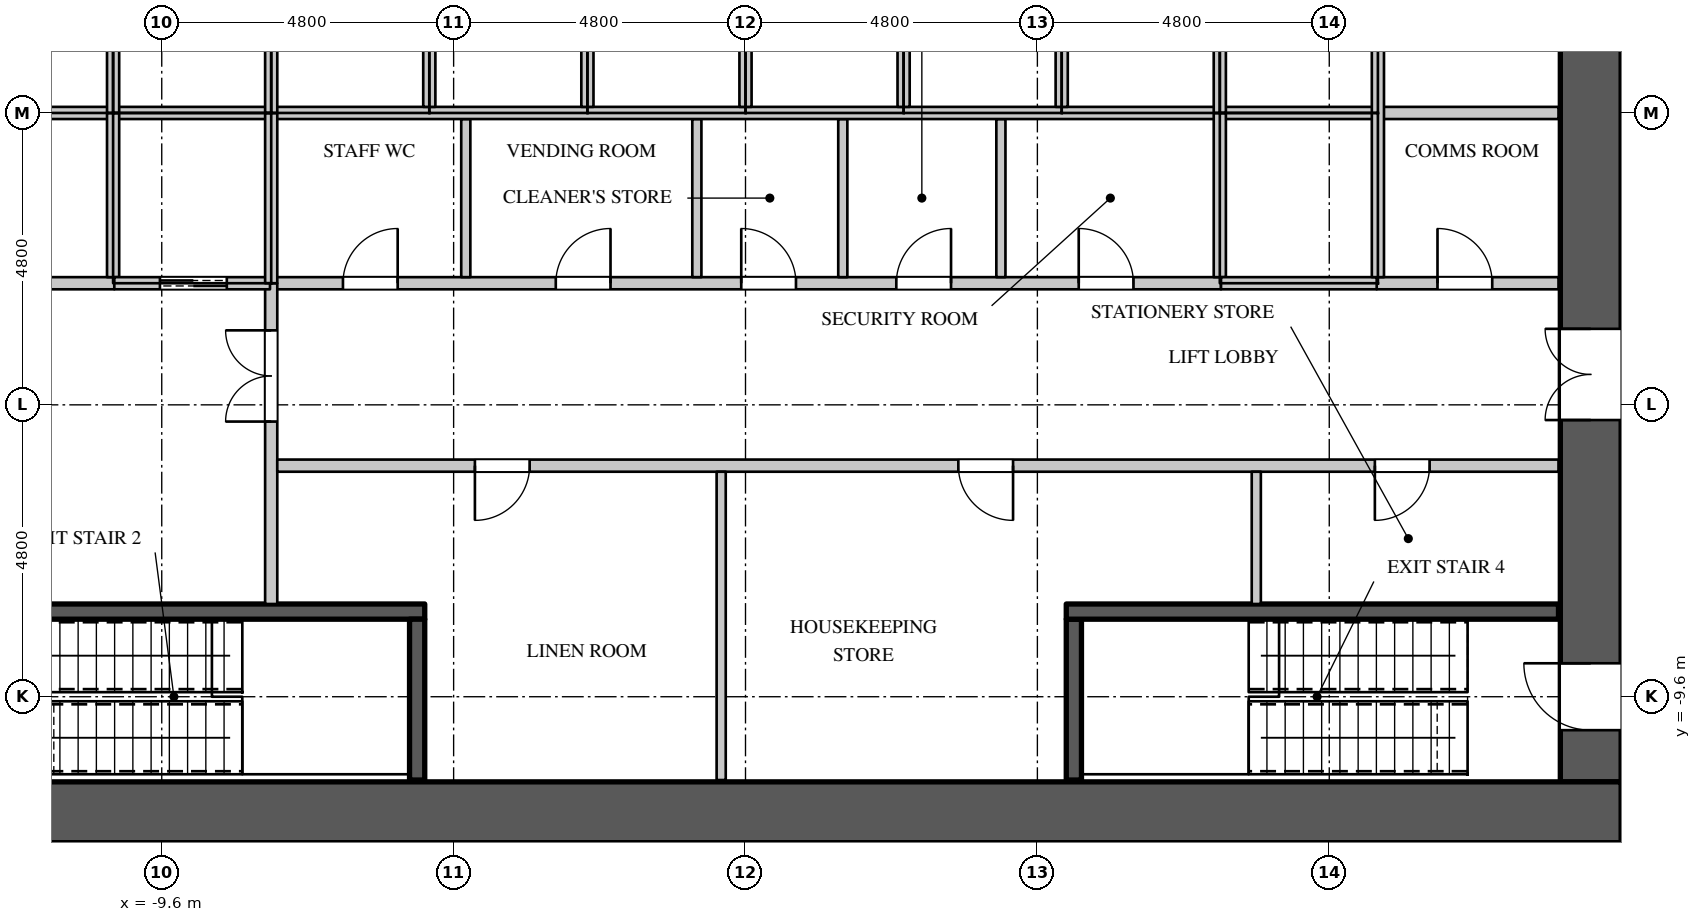
"""IFC4 building model, lengths in metres.
Left out: names, types, materials, properties, quantities, classifications, styles, units other than length and angle.
Written with IfcOpenShell. Run it as: python <this file> out.ifc"""

import sys

from ifc_helpers import new_model, si_unit, direction, frame, frame_2d, origin, place, context, subcontext, project, spatial, rectangle, extrude, element, fill, save


model = new_model("IFC4")
c1 = context("Model", 3, precision=1e-05, world=origin(), true_north=direction((0.0, 1.0)))
c2 = subcontext(c1, "Body", "Model", "MODEL_VIEW")
j1 = project(units=[si_unit("LENGTHUNIT", "METRE"), si_unit("PLANEANGLEUNIT", "RADIAN")], contexts=[c1])
p1 = place(None, origin())
s1 = spatial("IfcSite", under=j1, at=p1, CompositionType="ELEMENT")
p2 = place(p1, origin())
s2 = spatial("IfcBuilding", under=s1, at=p2, CompositionType="ELEMENT")
p3 = place(p2, frame((0.0, 0.0, 25.5)))
s3 = spatial("IfcBuildingStorey", under=s2, at=p3, CompositionType="ELEMENT", Elevation=25.5)
p4 = place(p3, frame((-14.4, -11.5, 0.0), z_axis=(0.0, 0.0, 1.0), x_axis=(1.0, 0.0, 0.0)))
e1 = element("IfcWall", 1, at=p4, inside=s3, PredefinedType="SHEAR", context=c2, shape_type="SweptSolid", body=[
    extrude(rectangle(XDim=28.8, YDim=1.0, at=frame_2d((14.4, 0.0))), origin(), (0.0, 0.0, 1.0), 4.2),
])
p5 = place(p3, frame((13.9, -11.0, 0.0), z_axis=(0.0, 0.0, 1.0), x_axis=(0.0, 1.0, 0.0)))
e2 = element("IfcWall", 2, at=p5, inside=s3, PredefinedType="SHEAR", context=c2, shape_type="SweptSolid", body=[
    extrude(rectangle(XDim=22.0, YDim=1.0, at=frame_2d((11.0, 0.0))), origin(), (0.0, 0.0, 1.0), 4.2),
])
p6 = place(p5, frame((20.05, 0.0, 0.0)))
e3 = element("IfcOpeningElement", 3, at=p6, cuts=e2, PredefinedType="OPENING", context=c2, shape_type="SweptSolid", body=[
    extrude(rectangle(XDim=1.1, YDim=2.2, at=frame_2d((0.55, 1.1))), frame((0.0, 0.51, 0.0), z_axis=(0.0, -1.0, 0.0), x_axis=(1.0, 0.0, 0.0)), (0.0, 0.0, 1.0), 1.02),
])
p7 = place(p5, frame((0.85, 0.0, 0.0)))
e4 = element("IfcOpeningElement", 4, at=p7, cuts=e2, PredefinedType="OPENING", context=c2, shape_type="SweptSolid", body=[
    extrude(rectangle(XDim=1.1, YDim=2.2, at=frame_2d((0.55, 1.1))), frame((0.0, 0.51, 0.0), z_axis=(0.0, -1.0, 0.0), x_axis=(1.0, 0.0, 0.0)), (0.0, 0.0, 1.0), 1.02),
])
p8 = place(p5, frame((14.55, 0.0, 0.0)))
e5 = element("IfcOpeningElement", 5, at=p8, cuts=e2, PredefinedType="OPENING", context=c2, shape_type="SweptSolid", body=[
    extrude(rectangle(XDim=1.5, YDim=2.4, at=frame_2d((0.75, 1.2))), frame((0.0, 0.51, 0.0), z_axis=(0.0, -1.0, 0.0), x_axis=(1.0, 0.0, 0.0)), (0.0, 0.0, 1.0), 1.02),
])
p9 = place(p5, frame((5.95, 0.0, 0.0)))
e6 = element("IfcOpeningElement", 6, at=p9, cuts=e2, PredefinedType="OPENING", context=c2, shape_type="SweptSolid", body=[
    extrude(rectangle(XDim=1.5, YDim=2.4, at=frame_2d((0.75, 1.2))), frame((0.0, 0.51, 0.0), z_axis=(0.0, -1.0, 0.0), x_axis=(1.0, 0.0, 0.0)), (0.0, 0.0, 1.0), 1.02),
])
p10 = place(p3, frame((-7.82, -2.8, 0.0), z_axis=(0.0, 0.0, 1.0), x_axis=(1.0, 0.0, 0.0)))
e7 = element("IfcWall", 7, at=p10, inside=s3, PredefinedType="PARTITIONING", context=c2, shape_type="SweptSolid", body=[
    extrude(rectangle(XDim=15.64, YDim=0.2, at=frame_2d((7.82, 0.0))), origin(), (0.0, 0.0, 1.0), 3.95),
])
p11 = place(p10, frame((1.2, 0.0, 0.0)))
e8 = element("IfcOpeningElement", 8, at=p11, cuts=e7, PredefinedType="OPENING", context=c2, shape_type="SweptSolid", body=[
    extrude(rectangle(XDim=0.9, YDim=2.2, at=frame_2d((0.45, 1.1))), frame((0.0, 0.11, 0.0), z_axis=(0.0, -1.0, 0.0), x_axis=(1.0, 0.0, 0.0)), (0.0, 0.0, 1.0), 0.22),
])
p12 = place(p10, frame((4.7, 0.0, 0.0)))
e9 = element("IfcOpeningElement", 9, at=p12, cuts=e7, PredefinedType="OPENING", context=c2, shape_type="SweptSolid", body=[
    extrude(rectangle(XDim=0.9, YDim=2.2, at=frame_2d((0.45, 1.1))), frame((0.0, 0.11, 0.0), z_axis=(0.0, -1.0, 0.0), x_axis=(1.0, 0.0, 0.0)), (0.0, 0.0, 1.0), 0.22),
])
p13 = place(p10, frame((7.75, 0.0, 0.0)))
e10 = element("IfcOpeningElement", 10, at=p13, cuts=e7, PredefinedType="OPENING", context=c2, shape_type="SweptSolid", body=[
    extrude(rectangle(XDim=0.9, YDim=2.2, at=frame_2d((0.45, 1.1))), frame((0.0, 0.11, 0.0), z_axis=(0.0, -1.0, 0.0), x_axis=(1.0, 0.0, 0.0)), (0.0, 0.0, 1.0), 0.22),
])
p14 = place(p10, frame((10.3, 0.0, 0.0)))
e11 = element("IfcOpeningElement", 11, at=p14, cuts=e7, PredefinedType="OPENING", context=c2, shape_type="SweptSolid", body=[
    extrude(rectangle(XDim=0.9, YDim=2.2, at=frame_2d((0.45, 1.1))), frame((0.0, 0.11, 0.0), z_axis=(0.0, -1.0, 0.0), x_axis=(1.0, 0.0, 0.0)), (0.0, 0.0, 1.0), 0.22),
])
p15 = place(p10, frame((13.3, 0.0, 0.0)))
e12 = element("IfcOpeningElement", 12, at=p15, cuts=e7, PredefinedType="OPENING", context=c2, shape_type="SweptSolid", body=[
    extrude(rectangle(XDim=0.9, YDim=2.2, at=frame_2d((0.45, 1.1))), frame((0.0, 0.11, 0.0), z_axis=(0.0, -1.0, 0.0), x_axis=(1.0, 0.0, 0.0)), (0.0, 0.0, 1.0), 0.22),
])
p16 = place(p3, frame((-7.8, -8.075, 0.0), z_axis=(0.0, 0.0, 1.0), x_axis=(0.0, 1.0, 0.0)))
e13 = element("IfcWall", 13, at=p16, inside=s3, PredefinedType="PARTITIONING", context=c2, shape_type="SweptSolid", body=[
    extrude(rectangle(XDim=5.275, YDim=0.2, at=frame_2d((2.637, 0.0))), origin(), (0.0, 0.0, 1.0), 3.95),
])
p17 = place(p16, frame((3.0, 0.0, 0.0)))
e14 = element("IfcOpeningElement", 14, at=p17, cuts=e13, PredefinedType="OPENING", context=c2, shape_type="SweptSolid", body=[
    extrude(rectangle(XDim=1.5, YDim=2.4, at=frame_2d((0.75, 1.2))), frame((0.0, 0.11, 0.0), z_axis=(0.0, -1.0, 0.0), x_axis=(1.0, 0.0, 0.0)), (0.0, 0.0, 1.0), 0.22),
])
p18 = place(p3, frame((-7.7, -5.8, 0.0), z_axis=(0.0, 0.0, 1.0), x_axis=(1.0, 0.0, 0.0)))
e15 = element("IfcWall", 15, at=p18, inside=s3, PredefinedType="PARTITIONING", context=c2, shape_type="SweptSolid", body=[
    extrude(rectangle(XDim=21.07, YDim=0.2, at=frame_2d((10.535, 0.0))), origin(), (0.0, 0.0, 1.0), 3.95),
])
p19 = place(p18, frame((3.25, 0.0, 0.0)))
e16 = element("IfcOpeningElement", 16, at=p19, cuts=e15, PredefinedType="OPENING", context=c2, shape_type="SweptSolid", body=[
    extrude(rectangle(XDim=0.9, YDim=2.2, at=frame_2d((0.45, 1.1))), frame((0.0, 0.11, 0.0), z_axis=(0.0, -1.0, 0.0), x_axis=(1.0, 0.0, 0.0)), (0.0, 0.0, 1.0), 0.22),
])
p20 = place(p18, frame((11.2, 0.0, 0.0)))
e17 = element("IfcOpeningElement", 17, at=p20, cuts=e15, PredefinedType="OPENING", context=c2, shape_type="SweptSolid", body=[
    extrude(rectangle(XDim=0.9, YDim=2.2, at=frame_2d((0.45, 1.1))), frame((0.0, 0.11, 0.0), z_axis=(0.0, -1.0, 0.0), x_axis=(1.0, 0.0, 0.0)), (0.0, 0.0, 1.0), 0.22),
])
p21 = place(p18, frame((18.05, 0.0, 0.0)))
e18 = element("IfcOpeningElement", 18, at=p21, cuts=e15, PredefinedType="OPENING", context=c2, shape_type="SweptSolid", body=[
    extrude(rectangle(XDim=0.9, YDim=2.2, at=frame_2d((0.45, 1.1))), frame((0.0, 0.11, 0.0), z_axis=(0.0, -1.0, 0.0), x_axis=(1.0, 0.0, 0.0)), (0.0, 0.0, 1.0), 0.22),
])
for number, where, z_axis, x_axis in (
    (19, (-4.6, -2.7, 0.0), (0.0, 0.0, 1.0), (0.0, 1.0, 0.0)),
    (20, (-0.8, -2.7, 0.0), (0.0, 0.0, 1.0), (0.0, 1.0, 0.0)),
):
    element("IfcWall", number, at=place(p3, frame(where, z_axis=z_axis, x_axis=x_axis)), inside=s3, PredefinedType="PARTITIONING", context=c2, shape_type="SweptSolid", body=[
        extrude(rectangle(XDim=2.6, YDim=0.15, at=frame_2d((1.3, 0.0))), origin(), (0.0, 0.0, 1.0), 3.95),
    ])
p22 = place(p3, frame((-0.4, -10.97, 0.0), z_axis=(0.0, 0.0, 1.0), x_axis=(0.0, 1.0, 0.0)))
e21 = element("IfcWall", 21, at=p22, inside=s3, PredefinedType="PARTITIONING", context=c2, shape_type="SweptSolid", body=[
    extrude(rectangle(XDim=5.07, YDim=0.15, at=frame_2d((2.535, 0.0))), origin(), (0.0, 0.0, 1.0), 3.95),
])
for number, where, z_axis, x_axis in (
    (22, (1.6, -2.7, 0.0), (0.0, 0.0, 1.0), (0.0, 1.0, 0.0)),
    (23, (4.2, -2.7, 0.0), (0.0, 0.0, 1.0), (0.0, 1.0, 0.0)),
):
    element("IfcWall", number, at=place(p3, frame(where, z_axis=z_axis, x_axis=x_axis)), inside=s3, PredefinedType="PARTITIONING", context=c2, shape_type="SweptSolid", body=[
        extrude(rectangle(XDim=2.6, YDim=0.15, at=frame_2d((1.3, 0.0))), origin(), (0.0, 0.0, 1.0), 3.95),
    ])
p23 = place(p3, frame((8.4, -8.075, 0.0), z_axis=(0.0, 0.0, 1.0), x_axis=(0.0, 1.0, 0.0)))
e24 = element("IfcWall", 24, at=p23, inside=s3, PredefinedType="PARTITIONING", context=c2, shape_type="SweptSolid", body=[
    extrude(rectangle(XDim=2.175, YDim=0.15, at=frame_2d((1.087, 0.0))), origin(), (0.0, 0.0, 1.0), 3.95),
])
p24 = place(p3, frame((-13.37, -2.8, 0.0), z_axis=(0.0, 0.0, 1.0), x_axis=(1.0, 0.0, 0.0)))
e25 = element("IfcWall", 25, at=p24, inside=s3, PredefinedType="PARTITIONING", context=c2, shape_type="SweptSolid", body=[
    extrude(rectangle(XDim=2.99, YDim=0.2, at=frame_2d((1.495, 0.0))), origin(), (0.0, 0.0, 1.0), 3.95),
])
p25 = place(p24, frame((1.2, 0.0, 0.0)))
e26 = element("IfcOpeningElement", 26, at=p25, cuts=e25, PredefinedType="OPENING", context=c2, shape_type="SweptSolid", body=[
    extrude(rectangle(XDim=0.6, YDim=2.0, at=frame_2d((0.3, 1.0))), frame((0.0, 0.11, 0.0), z_axis=(0.0, -1.0, 0.0), x_axis=(1.0, 0.0, 0.0)), (0.0, 0.0, 1.0), 0.22),
])
p26 = place(p3, frame((10.38, -2.8, 0.0), z_axis=(0.0, 0.0, 1.0), x_axis=(1.0, 0.0, 0.0)))
e27 = element("IfcWall", 27, at=p26, inside=s3, PredefinedType="PARTITIONING", context=c2, shape_type="SweptSolid", body=[
    extrude(rectangle(XDim=2.99, YDim=0.2, at=frame_2d((1.495, 0.0))), origin(), (0.0, 0.0, 1.0), 3.95),
])
p27 = place(p26, frame((1.0, 0.0, 0.0)))
e28 = element("IfcOpeningElement", 28, at=p27, cuts=e27, PredefinedType="OPENING", context=c2, shape_type="SweptSolid", body=[
    extrude(rectangle(XDim=0.9, YDim=2.2, at=frame_2d((0.45, 1.1))), frame((0.0, 0.11, 0.0), z_axis=(0.0, -1.0, 0.0), x_axis=(1.0, 0.0, 0.0)), (0.0, 0.0, 1.0), 0.22),
])
p28 = place(p3, frame((10.4, 0.0, 0.0), z_axis=(0.0, 0.0, 1.0), x_axis=(1.0, 0.0, 0.0)))
e29 = element("IfcWall", 29, at=p28, inside=s3, PredefinedType="PARTITIONING", context=c2, shape_type="SweptSolid", body=[
    extrude(rectangle(XDim=2.97, YDim=0.2, at=frame_2d((1.485, 0.0))), origin(), (0.0, 0.0, 1.0), 3.95),
])
p29 = place(p3, frame((-13.37, 0.0, 0.0), z_axis=(0.0, 0.0, 1.0), x_axis=(1.0, 0.0, 0.0)))
e30 = element("IfcWall", 30, at=p29, inside=s3, PredefinedType="PARTITIONING", context=c2, shape_type="SweptSolid", body=[
    extrude(rectangle(XDim=23.77, YDim=0.2, at=frame_2d((11.885, 0.0))), origin(), (0.0, 0.0, 1.0), 3.95),
])
p30 = place(p3, frame((-10.4, -2.7, 0.0), z_axis=(0.0, 0.0, 1.0), x_axis=(0.0, 1.0, 0.0)))
e31 = element("IfcWall", 31, at=p30, inside=s3, PredefinedType="PARTITIONING", context=c2, shape_type="SweptSolid", body=[
    extrude(rectangle(XDim=2.7, YDim=0.2, at=frame_2d((1.35, 0.0))), origin(), (0.0, 0.0, 1.0), 3.95),
])
p31 = place(p3, frame((-10.38, -2.8, 0.0), z_axis=(0.0, 0.0, 1.0), x_axis=(1.0, 0.0, 0.0)))
e32 = element("IfcWall", 32, at=p31, inside=s3, PredefinedType="PARTITIONING", context=c2, shape_type="SweptSolid", body=[
    extrude(rectangle(XDim=2.56, YDim=0.2, at=frame_2d((1.28, 0.0))), origin(), (0.0, 0.0, 1.0), 3.95),
])
p32 = place(p31, frame((0.75, 0.0, 0.0)))
e33 = element("IfcOpeningElement", 33, at=p32, cuts=e32, PredefinedType="OPENING", context=c2, shape_type="SweptSolid", body=[
    extrude(rectangle(XDim=1.1, YDim=2.2, at=frame_2d((0.55, 1.1))), frame((0.0, 0.11, 0.0), z_axis=(0.0, -1.0, 0.0), x_axis=(1.0, 0.0, 0.0)), (0.0, 0.0, 1.0), 0.22),
])
p33 = place(p3, frame((-10.4, 0.0, 0.0), z_axis=(0.0, 0.0, 1.0), x_axis=(0.0, 1.0, 0.0)))
e34 = element("IfcWall", 34, at=p33, inside=s3, PredefinedType="PARTITIONING", context=c2, shape_type="SweptSolid", body=[
    extrude(rectangle(XDim=2.7, YDim=0.2, at=frame_2d((1.35, 0.0))), origin(), (0.0, 0.0, 1.0), 3.95),
])
for number, where, z_axis, x_axis in (
    (35, (-7.8, -2.8, 0.0), (0.0, 0.0, 1.0), (0.0, 1.0, 0.0)),
    (36, (-7.8, 0.0, 0.0), (0.0, 0.0, 1.0), (0.0, 1.0, 0.0)),
):
    element("IfcWall", number, at=place(p3, frame(where, z_axis=z_axis, x_axis=x_axis)), inside=s3, PredefinedType="PARTITIONING", context=c2, shape_type="SweptSolid", body=[
        extrude(rectangle(XDim=2.8, YDim=0.2, at=frame_2d((1.4, 0.0))), origin(), (0.0, 0.0, 1.0), 3.95),
    ])
for number, where, z_axis, x_axis in (
    (37, (-5.2, 0.1, 0.0), (0.0, 0.0, 1.0), (0.0, 1.0, 0.0)),
    (38, (-2.6, 0.1, 0.0), (0.0, 0.0, 1.0), (0.0, 1.0, 0.0)),
    (39, (0.0, 0.1, 0.0), (0.0, 0.0, 1.0), (0.0, 1.0, 0.0)),
    (40, (2.6, 0.1, 0.0), (0.0, 0.0, 1.0), (0.0, 1.0, 0.0)),
    (41, (5.2, 0.1, 0.0), (0.0, 0.0, 1.0), (0.0, 1.0, 0.0)),
):
    element("IfcWall", number, at=place(p3, frame(where, z_axis=z_axis, x_axis=x_axis)), inside=s3, PredefinedType="PARTITIONING", context=c2, shape_type="SweptSolid", body=[
        extrude(rectangle(XDim=2.6, YDim=0.2, at=frame_2d((1.3, 0.0))), origin(), (0.0, 0.0, 1.0), 3.95),
    ])
p34 = place(p3, frame((7.8, -2.7, 0.0), z_axis=(0.0, 0.0, 1.0), x_axis=(0.0, 1.0, 0.0)))
e42 = element("IfcWall", 42, at=p34, inside=s3, PredefinedType="PARTITIONING", context=c2, shape_type="SweptSolid", body=[
    extrude(rectangle(XDim=2.7, YDim=0.2, at=frame_2d((1.35, 0.0))), origin(), (0.0, 0.0, 1.0), 3.95),
])
p35 = place(p3, frame((7.82, -2.8, 0.0), z_axis=(0.0, 0.0, 1.0), x_axis=(1.0, 0.0, 0.0)))
e43 = element("IfcWall", 43, at=p35, inside=s3, PredefinedType="PARTITIONING", context=c2, shape_type="SweptSolid", body=[
    extrude(rectangle(XDim=2.56, YDim=0.2, at=frame_2d((1.28, 0.0))), origin(), (0.0, 0.0, 1.0), 3.95),
])
p36 = place(p3, frame((7.8, 0.0, 0.0), z_axis=(0.0, 0.0, 1.0), x_axis=(0.0, 1.0, 0.0)))
e44 = element("IfcWall", 44, at=p36, inside=s3, PredefinedType="PARTITIONING", context=c2, shape_type="SweptSolid", body=[
    extrude(rectangle(XDim=2.7, YDim=0.2, at=frame_2d((1.35, 0.0))), origin(), (0.0, 0.0, 1.0), 3.95),
])
p37 = place(p3, frame((10.4, -2.7, 0.0), z_axis=(0.0, 0.0, 1.0), x_axis=(0.0, 1.0, 0.0)))
e45 = element("IfcWall", 45, at=p37, inside=s3, PredefinedType="PARTITIONING", context=c2, shape_type="SweptSolid", body=[
    extrude(rectangle(XDim=5.4, YDim=0.2, at=frame_2d((2.7, 0.0))), origin(), (0.0, 0.0, 1.0), 3.95),
])
p38 = place(p3, frame((-13.37, -8.2, 0.0), z_axis=(0.0, 0.0, 1.0), x_axis=(1.0, 0.0, 0.0)))
e46 = element("IfcWall", 46, at=p38, inside=s3, PredefinedType="SHEAR", context=c2, shape_type="SweptSolid", body=[
    extrude(rectangle(XDim=8.095, YDim=0.25, at=frame_2d((4.048, 0.0))), origin(), (0.0, 0.0, 1.0), 3.95),
])
p39 = place(p38, frame((0.15, 0.0, 0.0)))
e47 = element("IfcOpeningElement", 47, at=p39, cuts=e46, PredefinedType="OPENING", context=c2, shape_type="SweptSolid", body=[
    extrude(rectangle(XDim=1.1, YDim=2.2, at=frame_2d((0.55, 1.1))), frame((0.0, 0.135, 0.0), z_axis=(0.0, -1.0, 0.0), x_axis=(1.0, 0.0, 0.0)), (0.0, 0.0, 1.0), 0.27),
])
for number, where, z_axis, x_axis in (
    (48, (-5.4, -10.97, 0.0), (0.0, 0.0, 1.0), (0.0, 1.0, 0.0)),
    (49, (5.4, -10.97, 0.0), (0.0, 0.0, 1.0), (0.0, 1.0, 0.0)),
):
    element("IfcWall", number, at=place(p3, frame(where, z_axis=z_axis, x_axis=x_axis)), inside=s3, PredefinedType="SHEAR", context=c2, shape_type="SweptSolid", body=[
        extrude(rectangle(XDim=2.645, YDim=0.25, at=frame_2d((1.323, 0.0))), origin(), (0.0, 0.0, 1.0), 3.95),
    ])
p40 = place(p3, frame((5.275, -8.2, 0.0), z_axis=(0.0, 0.0, 1.0), x_axis=(1.0, 0.0, 0.0)))
e50 = element("IfcWall", 50, at=p40, inside=s3, PredefinedType="SHEAR", context=c2, shape_type="SweptSolid", body=[
    extrude(rectangle(XDim=8.095, YDim=0.25, at=frame_2d((4.048, 0.0))), origin(), (0.0, 0.0, 1.0), 3.95),
])
p41 = place(p27, origin())
e51 = element("IfcDoor", 51, at=p41, inside=s3, OperationType="SINGLE_SWING_LEFT", PredefinedType="DOOR", context=c2, shape_type="SweptSolid", body=[
    extrude(rectangle(XDim=0.9, YDim=2.2, at=frame_2d((0.45, 1.1))), frame((0.0, 0.025, 0.0), z_axis=(0.0, -1.0, 0.0), x_axis=(1.0, 0.0, 0.0)), (0.0, 0.0, 1.0), 0.05),
])
fill(e28, e51)
p42 = place(p19, origin())
e52 = element("IfcDoor", 52, at=p42, inside=s3, OperationType="SINGLE_SWING_RIGHT", PredefinedType="DOOR", context=c2, shape_type="SweptSolid", body=[
    extrude(rectangle(XDim=0.9, YDim=2.2, at=frame_2d((0.45, 1.1))), frame((0.0, 0.025, 0.0), z_axis=(0.0, -1.0, 0.0), x_axis=(1.0, 0.0, 0.0)), (0.0, 0.0, 1.0), 0.05),
])
fill(e16, e52)
p43 = place(p20, origin())
e53 = element("IfcDoor", 53, at=p43, inside=s3, OperationType="SINGLE_SWING_LEFT", PredefinedType="DOOR", context=c2, shape_type="SweptSolid", body=[
    extrude(rectangle(XDim=0.9, YDim=2.2, at=frame_2d((0.45, 1.1))), frame((0.0, 0.025, 0.0), z_axis=(0.0, -1.0, 0.0), x_axis=(1.0, 0.0, 0.0)), (0.0, 0.0, 1.0), 0.05),
])
fill(e17, e53)
p44 = place(p21, origin())
e54 = element("IfcDoor", 54, at=p44, inside=s3, OperationType="SINGLE_SWING_RIGHT", PredefinedType="DOOR", context=c2, shape_type="SweptSolid", body=[
    extrude(rectangle(XDim=0.9, YDim=2.2, at=frame_2d((0.45, 1.1))), frame((0.0, 0.025, 0.0), z_axis=(0.0, -1.0, 0.0), x_axis=(1.0, 0.0, 0.0)), (0.0, 0.0, 1.0), 0.05),
])
fill(e18, e54)
p45 = place(p11, origin())
e55 = element("IfcDoor", 55, at=p45, inside=s3, OperationType="SINGLE_SWING_RIGHT", PredefinedType="DOOR", context=c2, shape_type="SweptSolid", body=[
    extrude(rectangle(XDim=0.9, YDim=2.2, at=frame_2d((0.45, 1.1))), frame((0.0, 0.025, 0.0), z_axis=(0.0, -1.0, 0.0), x_axis=(1.0, 0.0, 0.0)), (0.0, 0.0, 1.0), 0.05),
])
fill(e8, e55)
p46 = place(p12, origin())
e56 = element("IfcDoor", 56, at=p46, inside=s3, OperationType="SINGLE_SWING_RIGHT", PredefinedType="DOOR", context=c2, shape_type="SweptSolid", body=[
    extrude(rectangle(XDim=0.9, YDim=2.2, at=frame_2d((0.45, 1.1))), frame((0.0, 0.025, 0.0), z_axis=(0.0, -1.0, 0.0), x_axis=(1.0, 0.0, 0.0)), (0.0, 0.0, 1.0), 0.05),
])
fill(e9, e56)
p47 = place(p13, origin())
e57 = element("IfcDoor", 57, at=p47, inside=s3, OperationType="SINGLE_SWING_LEFT", PredefinedType="DOOR", context=c2, shape_type="SweptSolid", body=[
    extrude(rectangle(XDim=0.9, YDim=2.2, at=frame_2d((0.45, 1.1))), frame((0.0, 0.025, 0.0), z_axis=(0.0, -1.0, 0.0), x_axis=(1.0, 0.0, 0.0)), (0.0, 0.0, 1.0), 0.05),
])
fill(e10, e57)
p48 = place(p14, origin())
e58 = element("IfcDoor", 58, at=p48, inside=s3, OperationType="SINGLE_SWING_RIGHT", PredefinedType="DOOR", context=c2, shape_type="SweptSolid", body=[
    extrude(rectangle(XDim=0.9, YDim=2.2, at=frame_2d((0.45, 1.1))), frame((0.0, 0.025, 0.0), z_axis=(0.0, -1.0, 0.0), x_axis=(1.0, 0.0, 0.0)), (0.0, 0.0, 1.0), 0.05),
])
fill(e11, e58)
p49 = place(p15, origin())
e59 = element("IfcDoor", 59, at=p49, inside=s3, OperationType="SINGLE_SWING_LEFT", PredefinedType="DOOR", context=c2, shape_type="SweptSolid", body=[
    extrude(rectangle(XDim=0.9, YDim=2.2, at=frame_2d((0.45, 1.1))), frame((0.0, 0.025, 0.0), z_axis=(0.0, -1.0, 0.0), x_axis=(1.0, 0.0, 0.0)), (0.0, 0.0, 1.0), 0.05),
])
fill(e12, e59)
p50 = place(p32, origin())
e60 = element("IfcDoor", 60, at=p50, inside=s3, OperationType="DOUBLE_DOOR_SLIDING", PredefinedType="DOOR", context=c2, shape_type="SweptSolid", body=[
    extrude(rectangle(XDim=1.1, YDim=2.2, at=frame_2d((0.55, 1.1))), frame((0.0, 0.025, 0.0), z_axis=(0.0, -1.0, 0.0), x_axis=(1.0, 0.0, 0.0)), (0.0, 0.0, 1.0), 0.05),
])
fill(e33, e60)
p51 = place(p17, origin())
e61 = element("IfcDoor", 61, at=p51, inside=s3, OperationType="DOUBLE_DOOR_SINGLE_SWING", PredefinedType="DOOR", context=c2, shape_type="SweptSolid", body=[
    extrude(rectangle(XDim=1.5, YDim=2.4, at=frame_2d((0.75, 1.2))), frame((0.0, 0.025, 0.0), z_axis=(0.0, -1.0, 0.0), x_axis=(1.0, 0.0, 0.0)), (0.0, 0.0, 1.0), 0.05),
])
fill(e14, e61)
p52 = place(p7, origin())
e62 = element("IfcDoor", 62, at=p52, inside=s3, OperationType="SINGLE_SWING_RIGHT", PredefinedType="DOOR", context=c2, shape_type="SweptSolid", body=[
    extrude(rectangle(XDim=1.1, YDim=2.2, at=frame_2d((0.55, 1.1))), frame((0.0, 0.495, 0.0), z_axis=(0.0, -1.0, 0.0), x_axis=(1.0, 0.0, 0.0)), (0.0, 0.0, 1.0), 0.05),
])
fill(e4, e62)
p53 = place(p9, origin())
e63 = element("IfcDoor", 63, at=p53, inside=s3, OperationType="DOUBLE_DOOR_SINGLE_SWING", PredefinedType="DOOR", context=c2, shape_type="SweptSolid", body=[
    extrude(rectangle(XDim=1.5, YDim=2.4, at=frame_2d((0.75, 1.2))), frame((0.0, 0.495, 0.0), z_axis=(0.0, -1.0, 0.0), x_axis=(1.0, 0.0, 0.0)), (0.0, 0.0, 1.0), 0.05),
])
fill(e6, e63)
save(model, sys.argv[1])
